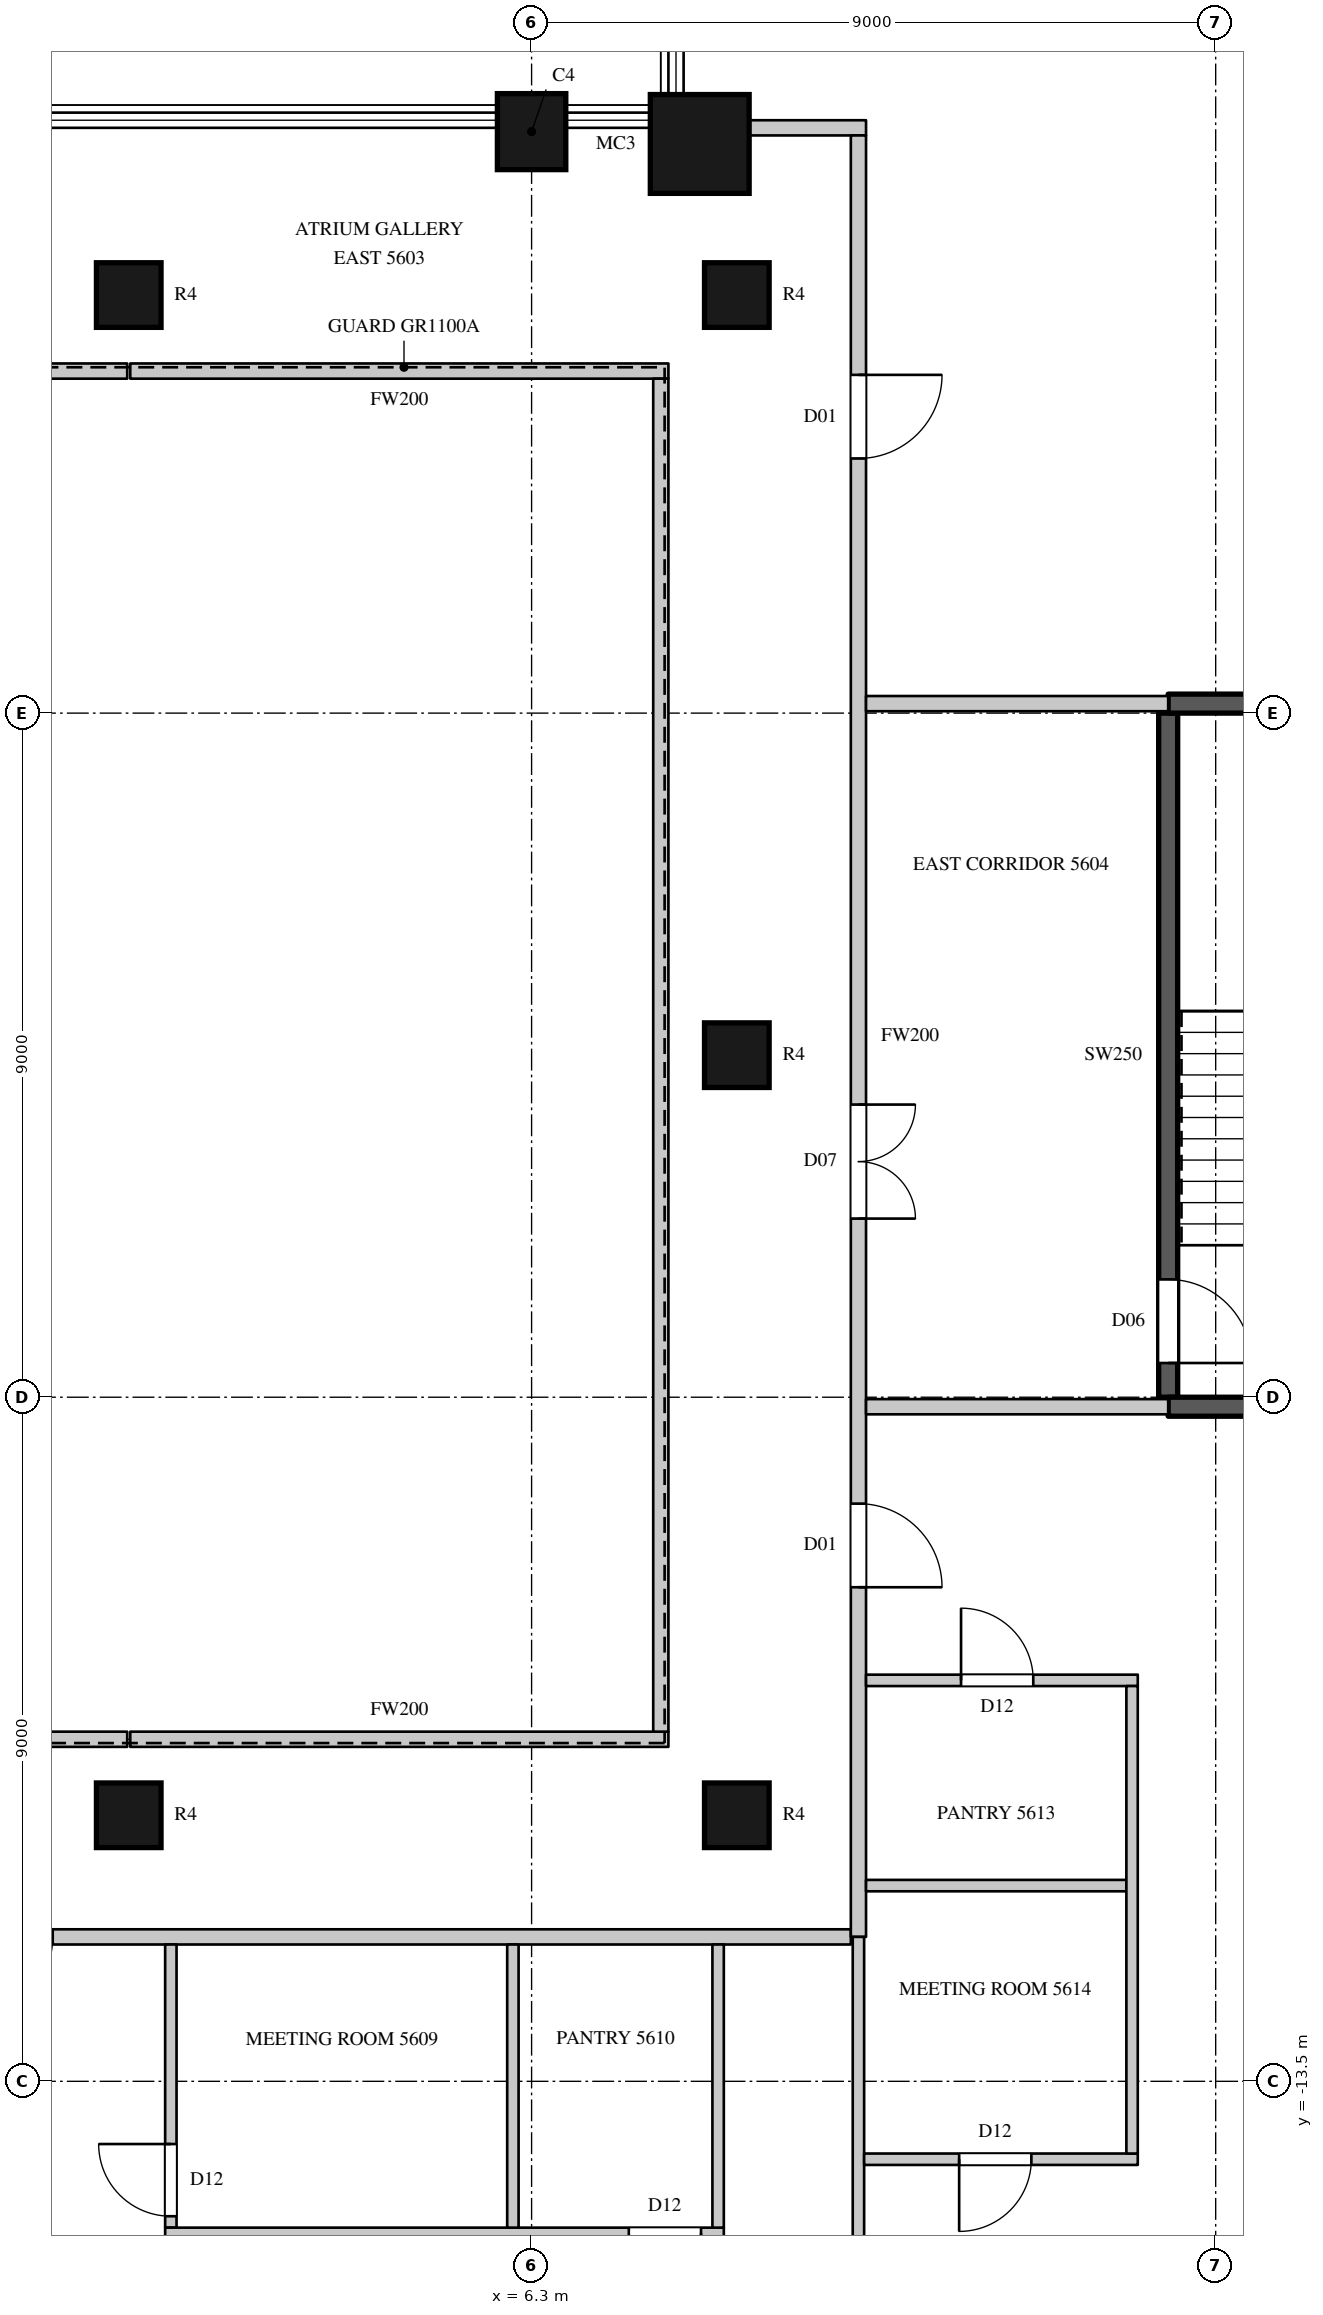
"""IFC4 building model, lengths in metres.
Left out: names, types, materials, properties, quantities, classifications, styles, units other than length and angle.
Written with IfcOpenShell. Run it as: python <this file> out.ifc"""

import sys

from ifc_helpers import new_model, si_unit, direction, frame, frame_2d, origin, origin_2d, place, context, subcontext, project, spatial, rectangle, circle, extrude, element, fill, save


model = new_model("IFC4")
c1 = context("Model", 3, precision=1e-05, world=origin(), true_north=direction((0.0, 1.0)))
c2 = subcontext(c1, "Body", "Model", "MODEL_VIEW")
j1 = project(units=[si_unit("LENGTHUNIT", "METRE"), si_unit("PLANEANGLEUNIT", "RADIAN")], contexts=[c1])
p1 = place(None, origin())
s1 = spatial("IfcSite", under=j1, at=p1, CompositionType="ELEMENT")
p2 = place(p1, origin())
s2 = spatial("IfcBuilding", under=s1, at=p2, CompositionType="ELEMENT")
p3 = place(p2, frame((0.0, 0.0, 251.6)))
s3 = spatial("IfcBuildingStorey", under=s2, at=p3, CompositionType="ELEMENT", Elevation=251.6)
p4 = place(p3, frame((8.512, 11.988, 0.0), z_axis=(0.0, 0.0, 1.0), x_axis=(1.0, 0.0, 0.0)))
e1 = element("IfcColumn", 1, at=p4, inside=s3, PredefinedType="COLUMN", context=c2, shape_type="SweptSolid", body=[
    extrude(circle(Radius=0.65, at=origin_2d()), origin(), (0.0, 0.0, 1.0), 4.1),
])
p5 = place(p3, frame((6.3, 12.15, 0.0), z_axis=(0.0, 0.0, 1.0), x_axis=(-1.0, 0.0, 0.0)))
e2 = element("IfcColumn", 2, at=p5, inside=s3, PredefinedType="COLUMN", context=c2, shape_type="SweptSolid", body=[
    extrude(rectangle(XDim=0.9, YDim=1.0, at=origin_2d()), origin(), (0.0, 0.0, 1.0), 4.1),
])
for number, where, z_axis, x_axis in (
    (3, (1.0, -10.0, 0.0), (0.0, 0.0, 1.0), (1.0, 0.0, 0.0)),
    (4, (1.0, 10.0, 0.0), (0.0, 0.0, 1.0), (1.0, 0.0, 0.0)),
    (5, (9.0, -10.0, 0.0), (0.0, 0.0, 1.0), (1.0, 0.0, 0.0)),
    (6, (9.0, 0.0, 0.0), (0.0, 0.0, 1.0), (1.0, 0.0, 0.0)),
    (7, (9.0, 10.0, 0.0), (0.0, 0.0, 1.0), (1.0, 0.0, 0.0)),
):
    element("IfcColumn", number, at=place(p3, frame(where, z_axis=z_axis, x_axis=x_axis)), inside=s3, PredefinedType="COLUMN", context=c2, shape_type="SweptSolid", body=[
        extrude(circle(Radius=0.425, at=origin_2d()), origin(), (0.0, 0.0, 1.0), 4.1),
    ])
p6 = place(p3, frame((-10.9, -11.6, 0.0), z_axis=(0.0, 0.0, 1.0), x_axis=(1.0, 0.0, 0.0)))
e8 = element("IfcWall", 8, at=p6, inside=s3, PredefinedType="PARTITIONING", context=c2, shape_type="SweptSolid", body=[
    extrude(rectangle(XDim=21.4, YDim=0.2, at=frame_2d((10.7, 0.0))), origin(), (0.0, 0.0, 1.0), 3.8),
])
p7 = place(p6, frame((0.95, 0.0, 0.0)))
e9 = element("IfcOpeningElement", 9, at=p7, cuts=e8, PredefinedType="OPENING", context=c2, shape_type="SweptSolid", body=[
    extrude(rectangle(XDim=0.9, YDim=2.2, at=frame_2d((0.45, 1.1))), frame((0.0, 0.11, 0.0), z_axis=(0.0, -1.0, 0.0), x_axis=(1.0, 0.0, 0.0)), (0.0, 0.0, 1.0), 0.22),
])
p8 = place(p6, frame((4.2, 0.0, 0.0)))
e10 = element("IfcOpeningElement", 10, at=p8, cuts=e8, PredefinedType="OPENING", context=c2, shape_type="SweptSolid", body=[
    extrude(rectangle(XDim=0.9, YDim=2.2, at=frame_2d((0.45, 1.1))), frame((0.0, 0.11, 0.0), z_axis=(0.0, -1.0, 0.0), x_axis=(1.0, 0.0, 0.0)), (0.0, 0.0, 1.0), 0.22),
])
p9 = place(p6, frame((6.85, 0.0, 0.0)))
e11 = element("IfcOpeningElement", 11, at=p9, cuts=e8, PredefinedType="OPENING", context=c2, shape_type="SweptSolid", body=[
    extrude(rectangle(XDim=1.1, YDim=2.4, at=frame_2d((0.55, 1.2))), frame((0.0, 0.11, 0.0), z_axis=(0.0, -1.0, 0.0), x_axis=(1.0, 0.0, 0.0)), (0.0, 0.0, 1.0), 0.22),
])
p10 = place(p6, frame((9.8, 0.0, 0.0)))
e12 = element("IfcOpeningElement", 12, at=p10, cuts=e8, PredefinedType="OPENING", context=c2, shape_type="SweptSolid", body=[
    extrude(rectangle(XDim=1.1, YDim=2.4, at=frame_2d((0.55, 1.2))), frame((0.0, 0.11, 0.0), z_axis=(0.0, -1.0, 0.0), x_axis=(1.0, 0.0, 0.0)), (0.0, 0.0, 1.0), 0.22),
])
for number, where, z_axis, x_axis in (
    (13, (-6.1, -9.0, 0.0), (0.0, 0.0, 1.0), (1.0, 0.0, 0.0)),
    (14, (-6.1, 9.0, 0.0), (0.0, 0.0, 1.0), (1.0, 0.0, 0.0)),
    (15, (1.02, -9.0, 0.0), (0.0, 0.0, 1.0), (1.0, 0.0, 0.0)),
    (16, (1.02, 9.0, 0.0), (0.0, 0.0, 1.0), (1.0, 0.0, 0.0)),
):
    element("IfcWall", number, at=place(p3, frame(where, z_axis=z_axis, x_axis=x_axis)), inside=s3, PredefinedType="PARTITIONING", context=c2, shape_type="SweptSolid", body=[
        extrude(rectangle(XDim=7.08, YDim=0.2, at=frame_2d((3.54, 0.0))), origin(), (0.0, 0.0, 1.0), 3.8),
    ])
p11 = place(p3, frame((8.0, -8.9, 0.0), z_axis=(0.0, 0.0, 1.0), x_axis=(0.0, 1.0, 0.0)))
e17 = element("IfcWall", 17, at=p11, inside=s3, PredefinedType="PARTITIONING", context=c2, shape_type="SweptSolid", body=[
    extrude(rectangle(XDim=17.8, YDim=0.2, at=frame_2d((8.9, 0.0))), origin(), (0.0, 0.0, 1.0), 3.8),
])
p12 = place(p3, frame((9.144, 12.2, 0.0), z_axis=(0.0, 0.0, 1.0), x_axis=(1.0, 0.0, 0.0)))
e18 = element("IfcWall", 18, at=p12, inside=s3, PredefinedType="PARTITIONING", context=c2, shape_type="SweptSolid", body=[
    extrude(rectangle(XDim=1.556, YDim=0.2, at=frame_2d((0.778, 0.0))), origin(), (0.0, 0.0, 1.0), 3.8),
])
p13 = place(p3, frame((10.6, -11.6, 0.0), z_axis=(0.0, 0.0, 1.0), x_axis=(0.0, 1.0, 0.0)))
e19 = element("IfcWall", 19, at=p13, inside=s3, PredefinedType="PARTITIONING", context=c2, shape_type="SweptSolid", body=[
    extrude(rectangle(XDim=23.7, YDim=0.2, at=frame_2d((11.85, 0.0))), origin(), (0.0, 0.0, 1.0), 3.8),
])
p14 = place(p13, frame((9.45, 0.0, 0.0)))
e20 = element("IfcOpeningElement", 20, at=p14, cuts=e19, PredefinedType="OPENING", context=c2, shape_type="SweptSolid", body=[
    extrude(rectangle(XDim=1.5, YDim=2.4, at=frame_2d((0.75, 1.2))), frame((0.0, 0.11, 0.0), z_axis=(0.0, -1.0, 0.0), x_axis=(1.0, 0.0, 0.0)), (0.0, 0.0, 1.0), 0.22),
])
p15 = place(p13, frame((19.45, 0.0, 0.0)))
e21 = element("IfcOpeningElement", 21, at=p15, cuts=e19, PredefinedType="OPENING", context=c2, shape_type="SweptSolid", body=[
    extrude(rectangle(XDim=1.1, YDim=2.4, at=frame_2d((0.55, 1.2))), frame((0.0, 0.11, 0.0), z_axis=(0.0, -1.0, 0.0), x_axis=(1.0, 0.0, 0.0)), (0.0, 0.0, 1.0), 0.22),
])
p16 = place(p13, frame((4.6, 0.0, 0.0)))
e22 = element("IfcOpeningElement", 22, at=p16, cuts=e19, PredefinedType="OPENING", context=c2, shape_type="SweptSolid", body=[
    extrude(rectangle(XDim=1.1, YDim=2.4, at=frame_2d((0.55, 1.2))), frame((0.0, 0.11, 0.0), z_axis=(0.0, -1.0, 0.0), x_axis=(1.0, 0.0, 0.0)), (0.0, 0.0, 1.0), 0.22),
])
for number, where, z_axis, x_axis in (
    (23, (10.7, -4.625, 0.0), (0.0, 0.0, 1.0), (1.0, 0.0, 0.0)),
    (24, (10.7, 4.625, 0.0), (0.0, 0.0, 1.0), (1.0, 0.0, 0.0)),
):
    element("IfcWall", number, at=place(p3, frame(where, z_axis=z_axis, x_axis=x_axis)), inside=s3, PredefinedType="PARTITIONING", context=c2, shape_type="SweptSolid", body=[
        extrude(rectangle(XDim=3.975, YDim=0.2, at=frame_2d((1.988, 0.0))), origin(), (0.0, 0.0, 1.0), 3.8),
    ])
p17 = place(p3, frame((1.554, -15.425, 0.0), z_axis=(0.0, 0.0, 1.0), x_axis=(0.0, 1.0, 0.0)))
e25 = element("IfcWall", 25, at=p17, inside=s3, PredefinedType="PARTITIONING", context=c2, shape_type="SweptSolid", body=[
    extrude(rectangle(XDim=3.725, YDim=0.15, at=frame_2d((1.863, 0.0))), origin(), (0.0, 0.0, 1.0), 3.8),
])
p18 = place(p17, frame((0.15, 0.0, 0.0)))
e26 = element("IfcOpeningElement", 26, at=p18, cuts=e25, PredefinedType="OPENING", context=c2, shape_type="SweptSolid", body=[
    extrude(rectangle(XDim=0.95, YDim=2.2, at=frame_2d((0.475, 1.1))), frame((0.0, 0.085, 0.0), z_axis=(0.0, -1.0, 0.0), x_axis=(1.0, 0.0, 0.0)), (0.0, 0.0, 1.0), 0.17),
])
p19 = place(p3, frame((1.479, -15.5, 0.0), z_axis=(0.0, 0.0, 1.0), x_axis=(1.0, 0.0, 0.0)))
e27 = element("IfcWall", 27, at=p19, inside=s3, PredefinedType="PARTITIONING", context=c2, shape_type="SweptSolid", body=[
    extrude(rectangle(XDim=7.35, YDim=0.15, at=frame_2d((3.675, 0.0))), origin(), (0.0, 0.0, 1.0), 3.8),
])
p20 = place(p19, frame((6.1, 0.0, 0.0)))
e28 = element("IfcOpeningElement", 28, at=p20, cuts=e27, PredefinedType="OPENING", context=c2, shape_type="SweptSolid", body=[
    extrude(rectangle(XDim=0.95, YDim=2.2, at=frame_2d((0.475, 1.1))), frame((0.0, 0.085, 0.0), z_axis=(0.0, -1.0, 0.0), x_axis=(1.0, 0.0, 0.0)), (0.0, 0.0, 1.0), 0.17),
])
for number, where, z_axis, x_axis in (
    (29, (6.054, -15.425, 0.0), (0.0, 0.0, 1.0), (0.0, 1.0, 0.0)),
    (30, (8.754, -15.425, 0.0), (0.0, 0.0, 1.0), (0.0, 1.0, 0.0)),
):
    element("IfcWall", number, at=place(p3, frame(where, z_axis=z_axis, x_axis=x_axis)), inside=s3, PredefinedType="PARTITIONING", context=c2, shape_type="SweptSolid", body=[
        extrude(rectangle(XDim=3.725, YDim=0.15, at=frame_2d((1.863, 0.0))), origin(), (0.0, 0.0, 1.0), 3.8),
    ])
p21 = place(p3, frame((10.6, -20.864, 0.0), z_axis=(0.0, 0.0, 1.0), x_axis=(0.0, 1.0, 0.0)))
e31 = element("IfcWall", 31, at=p21, inside=s3, PredefinedType="PARTITIONING", context=c2, shape_type="SweptSolid", body=[
    extrude(rectangle(XDim=9.264, YDim=0.15, at=frame_2d((4.632, 0.0))), origin(), (0.0, 0.0, 1.0), 3.8),
])
p22 = place(p3, frame((10.675, -14.525, 0.0), z_axis=(0.0, 0.0, 1.0), x_axis=(1.0, 0.0, 0.0)))
e32 = element("IfcWall", 32, at=p22, inside=s3, PredefinedType="PARTITIONING", context=c2, shape_type="SweptSolid", body=[
    extrude(rectangle(XDim=3.6, YDim=0.15, at=frame_2d((1.8, 0.0))), origin(), (0.0, 0.0, 1.0), 3.8),
])
p23 = place(p22, frame((1.25, 0.0, 0.0)))
e33 = element("IfcOpeningElement", 33, at=p23, cuts=e32, PredefinedType="OPENING", context=c2, shape_type="SweptSolid", body=[
    extrude(rectangle(XDim=0.95, YDim=2.2, at=frame_2d((0.475, 1.1))), frame((0.0, 0.085, 0.0), z_axis=(0.0, -1.0, 0.0), x_axis=(1.0, 0.0, 0.0)), (0.0, 0.0, 1.0), 0.17),
])
p24 = place(p3, frame((10.7, -10.925, 0.0), z_axis=(0.0, 0.0, 1.0), x_axis=(1.0, 0.0, 0.0)))
e34 = element("IfcWall", 34, at=p24, inside=s3, PredefinedType="PARTITIONING", context=c2, shape_type="SweptSolid", body=[
    extrude(rectangle(XDim=3.425, YDim=0.15, at=frame_2d((1.712, 0.0))), origin(), (0.0, 0.0, 1.0), 3.8),
])
p25 = place(p3, frame((10.7, -8.225, 0.0), z_axis=(0.0, 0.0, 1.0), x_axis=(1.0, 0.0, 0.0)))
e35 = element("IfcWall", 35, at=p25, inside=s3, PredefinedType="PARTITIONING", context=c2, shape_type="SweptSolid", body=[
    extrude(rectangle(XDim=3.575, YDim=0.15, at=frame_2d((1.788, 0.0))), origin(), (0.0, 0.0, 1.0), 3.15),
])
p26 = place(p25, frame((1.25, 0.0, 0.0)))
e36 = element("IfcOpeningElement", 36, at=p26, cuts=e35, PredefinedType="OPENING", context=c2, shape_type="SweptSolid", body=[
    extrude(rectangle(XDim=0.95, YDim=2.2, at=frame_2d((0.475, 1.1))), frame((0.0, 0.085, 0.0), z_axis=(0.0, -1.0, 0.0), x_axis=(1.0, 0.0, 0.0)), (0.0, 0.0, 1.0), 0.17),
])
p27 = place(p3, frame((14.2, -14.45, 0.0), z_axis=(0.0, 0.0, 1.0), x_axis=(0.0, 1.0, 0.0)))
e37 = element("IfcWall", 37, at=p27, inside=s3, PredefinedType="PARTITIONING", context=c2, shape_type="SweptSolid", body=[
    extrude(rectangle(XDim=6.15, YDim=0.15, at=frame_2d((3.075, 0.0))), origin(), (0.0, 0.0, 1.0), 3.8),
])
p28 = place(p3, frame((14.675, -4.5, 0.0), z_axis=(0.0, 0.0, 1.0), x_axis=(0.0, 1.0, 0.0)))
e38 = element("IfcWall", 38, at=p28, inside=s3, PredefinedType="SHEAR", context=c2, shape_type="SweptSolid", body=[
    extrude(rectangle(XDim=9.0, YDim=0.25, at=frame_2d((4.5, 0.0))), origin(), (0.0, 0.0, 1.0), 3.8),
])
p29 = place(p28, frame((0.45, 0.0, 0.0)))
e39 = element("IfcOpeningElement", 39, at=p29, cuts=e38, PredefinedType="OPENING", context=c2, shape_type="SweptSolid", body=[
    extrude(rectangle(XDim=1.1, YDim=2.2, at=frame_2d((0.55, 1.1))), frame((0.0, 0.135, 0.0), z_axis=(0.0, -1.0, 0.0), x_axis=(1.0, 0.0, 0.0)), (0.0, 0.0, 1.0), 0.27),
])
for number, where, z_axis, x_axis in (
    (40, (14.675, -4.625, 0.0), (0.0, 0.0, 1.0), (1.0, 0.0, 0.0)),
    (41, (14.675, 4.625, 0.0), (0.0, 0.0, 1.0), (1.0, 0.0, 0.0)),
):
    element("IfcWall", number, at=place(p3, frame(where, z_axis=z_axis, x_axis=x_axis)), inside=s3, PredefinedType="SHEAR", context=c2, shape_type="SweptSolid", body=[
        extrude(rectangle(XDim=4.45, YDim=0.25, at=frame_2d((2.225, 0.0))), origin(), (0.0, 0.0, 1.0), 3.8),
    ])
p30 = place(p14, origin())
e42 = element("IfcDoor", 42, at=p30, inside=s3, OperationType="DOUBLE_DOOR_SINGLE_SWING", PredefinedType="DOOR", context=c2, shape_type="SweptSolid", body=[
    extrude(rectangle(XDim=1.5, YDim=2.4, at=frame_2d((0.75, 1.2))), frame((0.0, 0.025, 0.0), z_axis=(0.0, -1.0, 0.0), x_axis=(1.0, 0.0, 0.0)), (0.0, 0.0, 1.0), 0.05),
])
fill(e20, e42)
p31 = place(p10, origin())
e43 = element("IfcDoor", 43, at=p31, inside=s3, OperationType="SINGLE_SWING_RIGHT", PredefinedType="DOOR", context=c2, shape_type="SweptSolid", body=[
    extrude(rectangle(XDim=1.1, YDim=2.4, at=frame_2d((0.55, 1.2))), frame((0.0, 0.025, 0.0), z_axis=(0.0, -1.0, 0.0), x_axis=(1.0, 0.0, 0.0)), (0.0, 0.0, 1.0), 0.05),
])
fill(e12, e43)
p32 = place(p18, origin())
e44 = element("IfcDoor", 44, at=p32, inside=s3, OperationType="SINGLE_SWING_RIGHT", PredefinedType="DOOR", context=c2, shape_type="SweptSolid", body=[
    extrude(rectangle(XDim=0.95, YDim=2.2, at=frame_2d((0.475, 1.1))), frame((0.0, 0.025, 0.0), z_axis=(0.0, -1.0, 0.0), x_axis=(1.0, 0.0, 0.0)), (0.0, 0.0, 1.0), 0.05),
])
fill(e26, e44)
p33 = place(p20, origin())
e45 = element("IfcDoor", 45, at=p33, inside=s3, OperationType="SINGLE_SWING_LEFT", PredefinedType="DOOR", context=c2, shape_type="SweptSolid", body=[
    extrude(rectangle(XDim=0.95, YDim=2.2, at=frame_2d((0.475, 1.1))), frame((0.0, 0.025, 0.0), z_axis=(0.0, -1.0, 0.0), x_axis=(1.0, 0.0, 0.0)), (0.0, 0.0, 1.0), 0.05),
])
fill(e28, e45)
p34 = place(p15, origin())
e46 = element("IfcDoor", 46, at=p34, inside=s3, OperationType="SINGLE_SWING_LEFT", PredefinedType="DOOR", context=c2, shape_type="SweptSolid", body=[
    extrude(rectangle(XDim=1.1, YDim=2.4, at=frame_2d((0.55, 1.2))), frame((0.0, 0.025, 0.0), z_axis=(0.0, -1.0, 0.0), x_axis=(1.0, 0.0, 0.0)), (0.0, 0.0, 1.0), 0.05),
])
fill(e21, e46)
p35 = place(p16, origin())
e47 = element("IfcDoor", 47, at=p35, inside=s3, OperationType="SINGLE_SWING_RIGHT", PredefinedType="DOOR", context=c2, shape_type="SweptSolid", body=[
    extrude(rectangle(XDim=1.1, YDim=2.4, at=frame_2d((0.55, 1.2))), frame((0.0, 0.025, 0.0), z_axis=(0.0, -1.0, 0.0), x_axis=(1.0, 0.0, 0.0)), (0.0, 0.0, 1.0), 0.05),
])
fill(e22, e47)
p36 = place(p26, origin())
e48 = element("IfcDoor", 48, at=p36, inside=s3, OperationType="SINGLE_SWING_LEFT", PredefinedType="DOOR", context=c2, shape_type="SweptSolid", body=[
    extrude(rectangle(XDim=0.95, YDim=2.2, at=frame_2d((0.475, 1.1))), frame((0.0, 0.025, 0.0), z_axis=(0.0, -1.0, 0.0), x_axis=(1.0, 0.0, 0.0)), (0.0, 0.0, 1.0), 0.05),
])
fill(e36, e48)
p37 = place(p23, origin())
e49 = element("IfcDoor", 49, at=p37, inside=s3, OperationType="SINGLE_SWING_RIGHT", PredefinedType="DOOR", context=c2, shape_type="SweptSolid", body=[
    extrude(rectangle(XDim=0.95, YDim=2.2, at=frame_2d((0.475, 1.1))), frame((0.0, 0.025, 0.0), z_axis=(0.0, -1.0, 0.0), x_axis=(1.0, 0.0, 0.0)), (0.0, 0.0, 1.0), 0.05),
])
fill(e33, e49)
p38 = place(p29, origin())
e50 = element("IfcDoor", 50, at=p38, inside=s3, OperationType="SINGLE_SWING_RIGHT", PredefinedType="DOOR", context=c2, shape_type="SweptSolid", body=[
    extrude(rectangle(XDim=1.1, YDim=2.2, at=frame_2d((0.55, 1.1))), frame((0.0, 0.025, 0.0), z_axis=(0.0, -1.0, 0.0), x_axis=(1.0, 0.0, 0.0)), (0.0, 0.0, 1.0), 0.05),
])
fill(e39, e50)
save(model, sys.argv[1])
